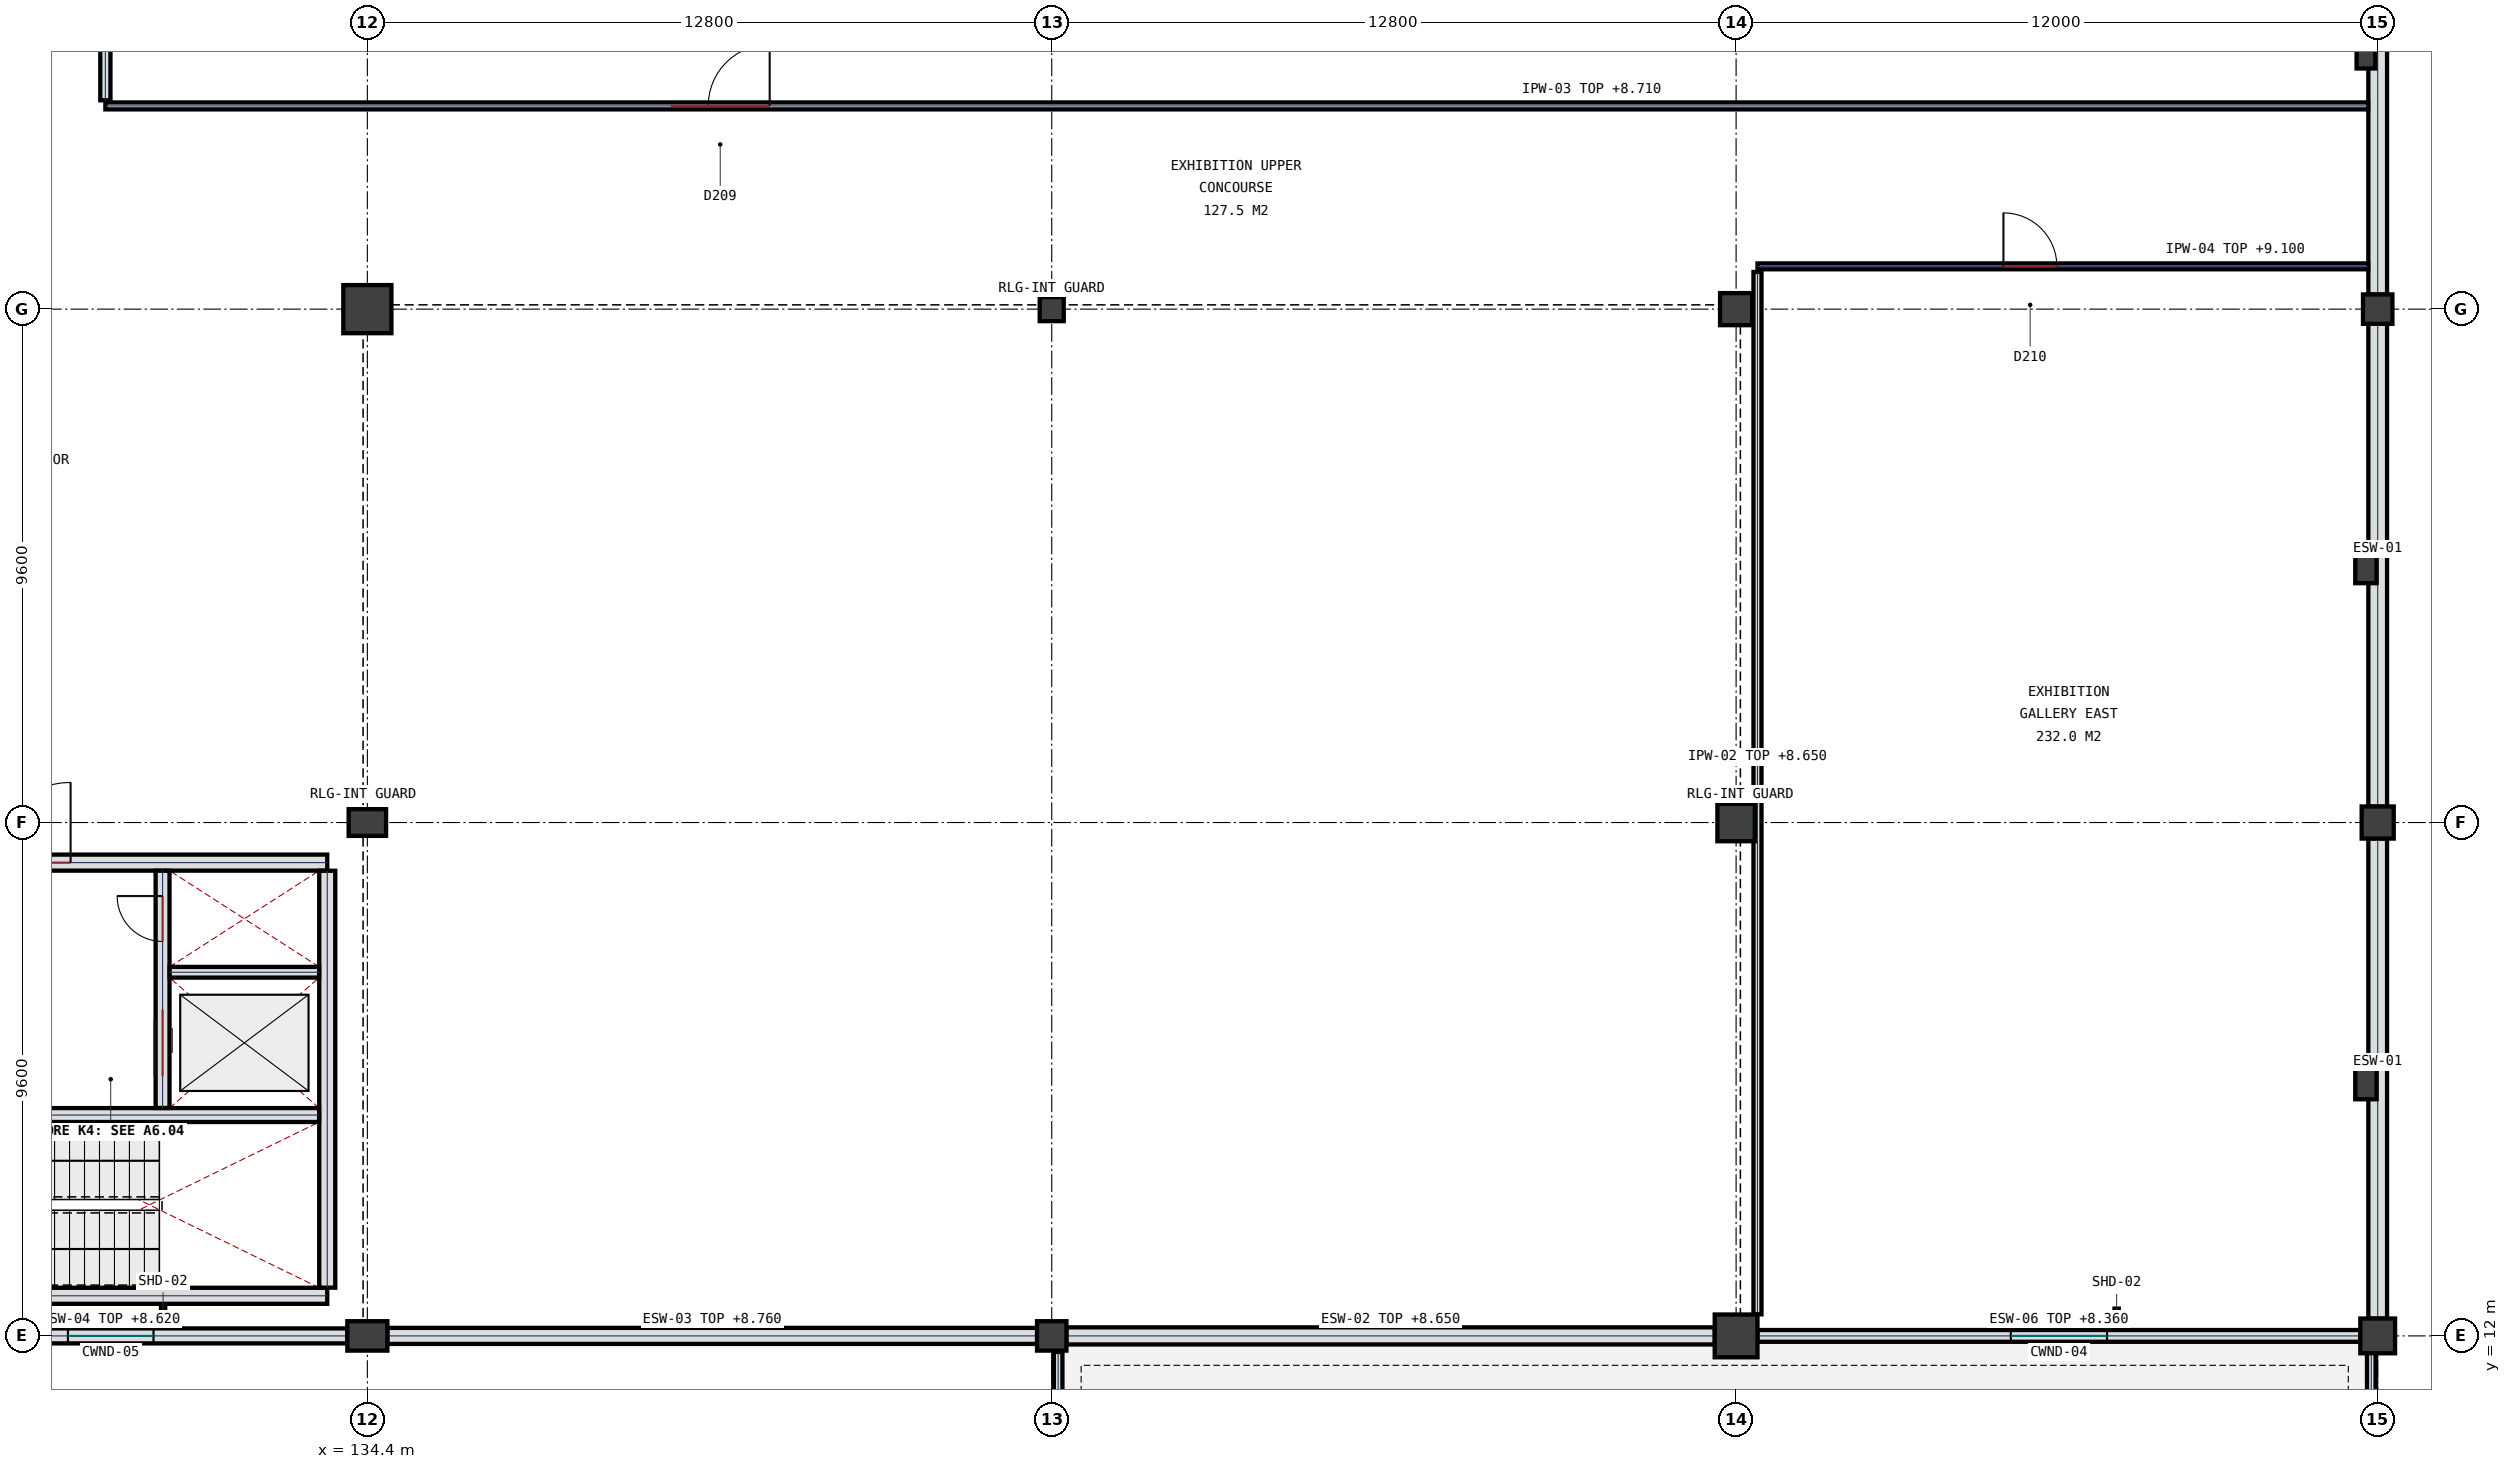
"""IFC4 building model, lengths in metres.
Left out: names, types, materials, properties, quantities, classifications, styles, units other than length and angle.
Written with IfcOpenShell. Run it as: python <this file> out.ifc"""

import sys

from ifc_helpers import new_model, si_unit, direction, frame, frame_2d, origin, origin_2d, place, context, subcontext, project, spatial, rectangle, circle, extrude, element, fill, save


model = new_model("IFC4")
c1 = context("Model", 3, precision=1e-05, world=origin(), true_north=direction((0.0, 1.0)))
c2 = subcontext(c1, "Body", "Model", "MODEL_VIEW")
j1 = project(units=[si_unit("LENGTHUNIT", "METRE"), si_unit("PLANEANGLEUNIT", "RADIAN")], contexts=[c1])
p1 = place(None, origin())
s1 = spatial("IfcSite", under=j1, at=p1, CompositionType="ELEMENT")
p2 = place(p1, origin())
s2 = spatial("IfcBuilding", under=s1, at=p2, CompositionType="ELEMENT")
p3 = place(p2, frame((0.0, 0.0, 5.4)))
s3 = spatial("IfcBuildingStorey", under=s2, at=p3, CompositionType="ELEMENT", Elevation=5.4)
p4 = place(p3, frame((134.4, 12.0, 0.0), z_axis=(0.0, 0.0, 1.0), x_axis=(1.0, 0.0, 0.0)))
e1 = element("IfcColumn", 1, at=p4, inside=s3, PredefinedType="COLUMN", context=c2, shape_type="SweptSolid", body=[
    extrude(rectangle(XDim=0.75, YDim=0.55, at=origin_2d()), origin(), (0.0, 0.0, 1.0), 4.5),
])
p5 = place(p3, frame((134.4, 21.6, 0.0), z_axis=(0.0, 0.0, 1.0), x_axis=(1.0, 0.0, 0.0)))
e2 = element("IfcColumn", 2, at=p5, inside=s3, PredefinedType="COLUMN", context=c2, shape_type="SweptSolid", body=[
    extrude(rectangle(XDim=0.7, YDim=0.5, at=origin_2d()), origin(), (0.0, 0.0, 1.0), 4.5),
])
p6 = place(p3, frame((134.4, 31.2, 0.0), z_axis=(0.0, 0.0, 1.0), x_axis=(1.0, 0.0, 0.0)))
e3 = element("IfcColumn", 3, at=p6, inside=s3, PredefinedType="COLUMN", context=c2, shape_type="SweptSolid", body=[
    extrude(circle(Radius=0.45, at=origin_2d()), origin(), (0.0, 0.0, 1.0), 4.5),
])
p7 = place(p3, frame((147.2, 12.0, 0.0), z_axis=(0.0, 0.0, 1.0), x_axis=(1.0, 0.0, 0.0)))
e4 = element("IfcColumn", 4, at=p7, inside=s3, PredefinedType="COLUMN", context=c2, shape_type="SweptSolid", body=[
    extrude(rectangle(XDim=0.55, YDim=0.55, at=origin_2d()), origin(), (0.0, 0.0, 1.0), 4.5),
])
p8 = place(p3, frame((147.2, 31.2, 0.0), z_axis=(0.0, 0.0, 1.0), x_axis=(1.0, 0.0, 0.0)))
e5 = element("IfcColumn", 5, at=p8, inside=s3, PredefinedType="COLUMN", context=c2, shape_type="SweptSolid", body=[
    extrude(rectangle(XDim=0.45, YDim=0.45, at=origin_2d()), origin(), (0.0, 0.0, 1.0), 4.5),
])
p9 = place(p3, frame((160.0, 12.0, 0.0), z_axis=(0.0, 0.0, 1.0), x_axis=(1.0, 0.0, 0.0)))
e6 = element("IfcColumn", 6, at=p9, inside=s3, PredefinedType="COLUMN", context=c2, shape_type="SweptSolid", body=[
    extrude(circle(Radius=0.4, at=origin_2d()), origin(), (0.0, 0.0, 1.0), 4.5),
])
p10 = place(p3, frame((160.0, 21.6, 0.0), z_axis=(0.0, 0.0, 1.0), x_axis=(1.0, 0.0, 0.0)))
e7 = element("IfcColumn", 7, at=p10, inside=s3, PredefinedType="COLUMN", context=c2, shape_type="SweptSolid", body=[
    extrude(circle(Radius=0.35, at=origin_2d()), origin(), (0.0, 0.0, 1.0), 4.5),
])
p11 = place(p3, frame((160.0, 31.2, 0.0), z_axis=(0.0, 0.0, 1.0), x_axis=(1.0, 0.0, 0.0)))
e8 = element("IfcColumn", 8, at=p11, inside=s3, PredefinedType="COLUMN", context=c2, shape_type="SweptSolid", body=[
    extrude(circle(Radius=0.3, at=origin_2d()), origin(), (0.0, 0.0, 1.0), 4.5),
])
p12 = place(p3, frame((172.0, 12.0, 0.0), z_axis=(0.0, 0.0, 1.0), x_axis=(1.0, 0.0, 0.0)))
e9 = element("IfcColumn", 9, at=p12, inside=s3, PredefinedType="COLUMN", context=c2, shape_type="SweptSolid", body=[
    extrude(rectangle(XDim=0.65, YDim=0.65, at=origin_2d()), origin(), (0.0, 0.0, 1.0), 4.5),
])
p13 = place(p3, frame((172.0, 21.6, 0.0), z_axis=(0.0, 0.0, 1.0), x_axis=(1.0, 0.0, 0.0)))
e10 = element("IfcColumn", 10, at=p13, inside=s3, PredefinedType="COLUMN", context=c2, shape_type="SweptSolid", body=[
    extrude(rectangle(XDim=0.6, YDim=0.6, at=origin_2d()), origin(), (0.0, 0.0, 1.0), 4.5),
])
p14 = place(p3, frame((172.0, 31.2, 0.0), z_axis=(0.0, 0.0, 1.0), x_axis=(1.0, 0.0, 0.0)))
e11 = element("IfcColumn", 11, at=p14, inside=s3, PredefinedType="COLUMN", context=c2, shape_type="SweptSolid", body=[
    extrude(rectangle(XDim=0.55, YDim=0.55, at=origin_2d()), origin(), (0.0, 0.0, 1.0), 4.5),
])
p15 = place(p3, frame((171.78, 16.8, 0.0), z_axis=(0.0, 0.0, 1.0), x_axis=(1.0, 0.0, 0.0)))
e12 = element("IfcColumn", 12, at=p15, inside=s3, PredefinedType="PILASTER", context=c2, shape_type="SweptSolid", body=[
    extrude(rectangle(XDim=0.4, YDim=0.75, at=origin_2d()), origin(), (0.0, 0.0, 1.0), 4.5),
])
p16 = place(p3, frame((171.78, 26.4, 0.0), z_axis=(0.0, 0.0, 1.0), x_axis=(1.0, 0.0, 0.0)))
e13 = element("IfcColumn", 13, at=p16, inside=s3, PredefinedType="PILASTER", context=c2, shape_type="SweptSolid", body=[
    extrude(rectangle(XDim=0.4, YDim=0.65, at=origin_2d()), origin(), (0.0, 0.0, 1.0), 4.5),
])
p17 = place(p3, frame((171.78, 36.0, 0.0), z_axis=(0.0, 0.0, 1.0), x_axis=(1.0, 0.0, 0.0)))
e14 = element("IfcColumn", 14, at=p17, inside=s3, PredefinedType="PILASTER", context=c2, shape_type="SweptSolid", body=[
    extrude(rectangle(XDim=0.35, YDim=0.6, at=origin_2d()), origin(), (0.0, 0.0, 1.0), 4.5),
])
p18 = place(p3, frame((172.0, 40.552, 0.0), z_axis=(0.0, 0.0, 1.0), x_axis=(0.0, -1.0, 0.0)))
e15 = element("IfcWall", 15, at=p18, inside=s3, PredefinedType="SOLIDWALL", context=c2, shape_type="SweptSolid", body=[
    extrude(rectangle(XDim=9.079, YDim=0.35, at=frame_2d((4.54, 0.0))), origin(), (0.0, 0.0, 1.0), 4.26),
])
p19 = place(p3, frame((172.0, 30.927, 0.0), z_axis=(0.0, 0.0, 1.0), x_axis=(0.0, -1.0, 0.0)))
e16 = element("IfcWall", 16, at=p19, inside=s3, PredefinedType="SOLIDWALL", context=c2, shape_type="SweptSolid", body=[
    extrude(rectangle(XDim=9.029, YDim=0.35, at=frame_2d((4.515, 0.0))), origin(), (0.0, 0.0, 1.0), 4.26),
])
p20 = place(p3, frame((172.0, 21.302, 0.0), z_axis=(0.0, 0.0, 1.0), x_axis=(0.0, -1.0, 0.0)))
e17 = element("IfcWall", 17, at=p20, inside=s3, PredefinedType="SOLIDWALL", context=c2, shape_type="SweptSolid", body=[
    extrude(rectangle(XDim=8.979, YDim=0.35, at=frame_2d((4.49, 0.0))), origin(), (0.0, 0.0, 1.0), 4.26),
])
p21 = place(p3, frame((171.677, 12.0, 0.0), z_axis=(0.0, 0.0, 1.0), x_axis=(-1.0, 0.0, 0.0)))
e18 = element("IfcWall", 18, at=p21, inside=s3, PredefinedType="SOLIDWALL", context=c2, shape_type="SweptSolid", body=[
    extrude(rectangle(XDim=11.279, YDim=0.22, at=frame_2d((5.64, 0.0))), origin(), (0.0, 0.0, 1.0), 2.96),
])
p22 = place(p21, frame((4.74, 0.0, 0.95)))
e19 = element("IfcOpeningElement", 19, at=p22, cuts=e18, PredefinedType="OPENING", context=c2, shape_type="SweptSolid", body=[
    extrude(rectangle(XDim=1.8, YDim=1.55, at=frame_2d((0.9, 0.775))), frame((0.0, 0.12, 0.0), z_axis=(0.0, -1.0, 0.0), x_axis=(1.0, 0.0, 0.0)), (0.0, 0.0, 1.0), 0.24),
])
p23 = place(p3, frame((159.602, 12.0, 0.0), z_axis=(0.0, 0.0, 1.0), x_axis=(-1.0, 0.0, 0.0)))
e20 = element("IfcWall", 20, at=p23, inside=s3, PredefinedType="SOLIDWALL", context=c2, shape_type="SweptSolid", body=[
    extrude(rectangle(XDim=12.129, YDim=0.32, at=frame_2d((6.064, 0.0))), origin(), (0.0, 0.0, 1.0), 3.25),
])
p24 = place(p3, frame((146.927, 12.0, 0.0), z_axis=(0.0, 0.0, 1.0), x_axis=(-1.0, 0.0, 0.0)))
e21 = element("IfcWall", 21, at=p24, inside=s3, PredefinedType="SOLIDWALL", context=c2, shape_type="SweptSolid", body=[
    extrude(rectangle(XDim=12.154, YDim=0.3, at=frame_2d((6.077, 0.0))), origin(), (0.0, 0.0, 1.0), 3.36),
])
p25 = place(p3, frame((134.027, 12.0, 0.0), z_axis=(0.0, 0.0, 1.0), x_axis=(-1.0, 0.0, 0.0)))
e22 = element("IfcWall", 22, at=p25, inside=s3, PredefinedType="SOLIDWALL", context=c2, shape_type="SweptSolid", body=[
    extrude(rectangle(XDim=8.854, YDim=0.28, at=frame_2d((4.427, 0.0))), origin(), (0.0, 0.0, 1.0), 3.22),
])
p26 = place(p25, frame((3.627, 0.0, 0.95)))
e23 = element("IfcOpeningElement", 23, at=p26, cuts=e22, PredefinedType="OPENING", context=c2, shape_type="SweptSolid", body=[
    extrude(rectangle(XDim=1.6, YDim=1.55, at=frame_2d((0.8, 0.775))), frame((0.0, 0.15, 0.0), z_axis=(0.0, -1.0, 0.0), x_axis=(1.0, 0.0, 0.0)), (0.0, 0.0, 1.0), 0.3),
])
for number, where, z_axis, x_axis in (
    (24, (147.32, 0.3, 0.0), (0.0, 0.0, 1.0), (0.0, 1.0, 0.0)),
    (25, (171.88, 0.3, 0.0), (0.0, 0.0, 1.0), (0.0, 1.0, 0.0)),
):
    element("IfcWall", number, at=place(p3, frame(where, z_axis=z_axis, x_axis=x_axis)), inside=s3, PredefinedType="PARAPET", context=c2, shape_type="SweptSolid", body=[
        extrude(rectangle(XDim=11.4, YDim=0.16, at=frame_2d((5.7, 0.0))), origin(), (0.0, 0.0, 1.0), 1.15),
    ])
p27 = place(p3, frame((133.65, 12.75, 0.0), z_axis=(0.0, 0.0, 1.0), x_axis=(-1.0, 0.0, 0.0)))
e26 = element("IfcWall", 26, at=p27, inside=s3, PredefinedType="SHEAR", context=c2, shape_type="SweptSolid", body=[
    extrude(rectangle(XDim=8.1, YDim=0.3, at=frame_2d((4.05, 0.0))), origin(), (0.0, 0.0, 1.0), 4.5),
])
p28 = place(p3, frame((125.55, 20.85, 0.0), z_axis=(0.0, 0.0, 1.0), x_axis=(1.0, 0.0, 0.0)))
e27 = element("IfcWall", 27, at=p28, inside=s3, PredefinedType="SHEAR", context=c2, shape_type="SweptSolid", body=[
    extrude(rectangle(XDim=8.1, YDim=0.3, at=frame_2d((4.05, 0.0))), origin(), (0.0, 0.0, 1.0), 4.5),
])
p29 = place(p28, frame((1.8, 0.0, 0.0)))
e28 = element("IfcOpeningElement", 28, at=p29, cuts=e27, PredefinedType="OPENING", context=c2, shape_type="SweptSolid", body=[
    extrude(rectangle(XDim=1.5, YDim=2.25, at=frame_2d((0.75, 1.125))), frame((0.0, 0.16, 0.0), z_axis=(0.0, -1.0, 0.0), x_axis=(1.0, 0.0, 0.0)), (0.0, 0.0, 1.0), 0.32),
])
p30 = place(p3, frame((133.65, 20.698, 0.0), z_axis=(0.0, 0.0, 1.0), x_axis=(0.0, -1.0, 0.0)))
e29 = element("IfcWall", 29, at=p30, inside=s3, PredefinedType="SHEAR", context=c2, shape_type="SweptSolid", body=[
    extrude(rectangle(XDim=7.796, YDim=0.3, at=frame_2d((3.898, 0.0))), origin(), (0.0, 0.0, 1.0), 4.5),
])
p31 = place(p3, frame((125.702, 16.13, 0.0), z_axis=(0.0, 0.0, 1.0), x_axis=(1.0, 0.0, 0.0)))
e30 = element("IfcWall", 30, at=p31, inside=s3, PredefinedType="SHEAR", context=c2, shape_type="SweptSolid", body=[
    extrude(rectangle(XDim=7.796, YDim=0.26, at=frame_2d((3.898, 0.0))), origin(), (0.0, 0.0, 1.0), 4.5),
])
p32 = place(p31, frame((0.148, 0.0, 0.0)))
e31 = element("IfcOpeningElement", 31, at=p32, cuts=e30, PredefinedType="OPENING", context=c2, shape_type="SweptSolid", body=[
    extrude(rectangle(XDim=1.2, YDim=2.2, at=frame_2d((0.6, 1.1))), frame((0.0, 0.14, 0.0), z_axis=(0.0, -1.0, 0.0), x_axis=(1.0, 0.0, 0.0)), (0.0, 0.0, 1.0), 0.28),
])
p33 = place(p3, frame((130.57, 16.262, 0.0), z_axis=(0.0, 0.0, 1.0), x_axis=(0.0, 1.0, 0.0)))
e32 = element("IfcWall", 32, at=p33, inside=s3, PredefinedType="SHEAR", context=c2, shape_type="SweptSolid", body=[
    extrude(rectangle(XDim=4.436, YDim=0.26, at=frame_2d((2.218, 0.0))), origin(), (0.0, 0.0, 1.0), 4.5),
])
p34 = place(p33, frame((3.113, 0.0, 0.0)))
e33 = element("IfcOpeningElement", 33, at=p34, cuts=e32, PredefinedType="OPENING", context=c2, shape_type="SweptSolid", body=[
    extrude(rectangle(XDim=0.85, YDim=2.05, at=frame_2d((0.425, 1.025))), frame((0.0, 0.14, 0.0), z_axis=(0.0, -1.0, 0.0), x_axis=(1.0, 0.0, 0.0)), (0.0, 0.0, 1.0), 0.28),
])
p35 = place(p33, frame((0.593, 0.0, 0.0)))
e34 = element("IfcOpeningElement", 34, at=p35, cuts=e32, PredefinedType="OPENING", context=c2, shape_type="SweptSolid", body=[
    extrude(rectangle(XDim=1.25, YDim=2.2, at=frame_2d((0.625, 1.1))), frame((0.0, 0.14, 0.0), z_axis=(0.0, -1.0, 0.0), x_axis=(1.0, 0.0, 0.0)), (0.0, 0.0, 1.0), 0.28),
])
p36 = place(p3, frame((130.702, 18.8, 0.0), z_axis=(0.0, 0.0, 1.0), x_axis=(1.0, 0.0, 0.0)))
e35 = element("IfcWall", 35, at=p36, inside=s3, PredefinedType="PLUMBINGWALL", context=c2, shape_type="SweptSolid", body=[
    extrude(rectangle(XDim=2.796, YDim=0.2, at=frame_2d((1.398, 0.0))), origin(), (0.0, 0.0, 1.0), 4.22),
])
p37 = place(p3, frame((129.5, 35.0, 0.0), z_axis=(0.0, 0.0, 1.0), x_axis=(1.0, 0.0, 0.0)))
e36 = element("IfcWall", 36, at=p37, inside=s3, PredefinedType="PARTITIONING", context=c2, shape_type="SweptSolid", body=[
    extrude(rectangle(XDim=42.322, YDim=0.13, at=frame_2d((21.161, 0.0))), origin(), (0.0, 0.0, 1.0), 3.31),
])
p38 = place(p37, frame((10.575, 0.0, 0.0)))
e37 = element("IfcOpeningElement", 37, at=p38, cuts=e36, PredefinedType="OPENING", context=c2, shape_type="SweptSolid", body=[
    extrude(rectangle(XDim=1.85, YDim=2.35, at=frame_2d((0.925, 1.175))), frame((0.0, 0.075, 0.0), z_axis=(0.0, -1.0, 0.0), x_axis=(1.0, 0.0, 0.0)), (0.0, 0.0, 1.0), 0.15),
])
p39 = place(p3, frame((160.4, 32.0, 0.0), z_axis=(0.0, 0.0, 1.0), x_axis=(1.0, 0.0, 0.0)))
e38 = element("IfcWall", 38, at=p39, inside=s3, PredefinedType="PARTITIONING", context=c2, shape_type="SweptSolid", body=[
    extrude(rectangle(XDim=11.422, YDim=0.11, at=frame_2d((5.711, 0.0))), origin(), (0.0, 0.0, 1.0), 3.7),
])
p40 = place(p39, frame((4.6, 0.0, 0.0)))
e39 = element("IfcOpeningElement", 39, at=p40, cuts=e38, PredefinedType="OPENING", context=c2, shape_type="SweptSolid", body=[
    extrude(rectangle(XDim=1.0, YDim=2.2, at=frame_2d((0.5, 1.1))), frame((0.0, 0.065, 0.0), z_axis=(0.0, -1.0, 0.0), x_axis=(1.0, 0.0, 0.0)), (0.0, 0.0, 1.0), 0.13),
])
p41 = place(p3, frame((129.5, 35.105, 0.0), z_axis=(0.0, 0.0, 1.0), x_axis=(0.0, 1.0, 0.0)))
e40 = element("IfcWall", 40, at=p41, inside=s3, PredefinedType="PARTITIONING", context=c2, shape_type="SweptSolid", body=[
    extrude(rectangle(XDim=5.566, YDim=0.19, at=frame_2d((2.783, 0.0))), origin(), (0.0, 0.0, 1.0), 2.65),
])
p42 = place(p3, frame((160.4, 12.403, 0.0), z_axis=(0.0, 0.0, 1.0), x_axis=(0.0, 1.0, 0.0)))
e41 = element("IfcWall", 41, at=p42, inside=s3, PredefinedType="PARTITIONING", context=c2, shape_type="SweptSolid", body=[
    extrude(rectangle(XDim=19.492, YDim=0.15, at=frame_2d((9.746, 0.0))), origin(), (0.0, 0.0, 1.0), 3.25),
])
p43 = place(p22, origin())
e42 = element("IfcWindow", 42, at=p43, inside=s3, PartitioningType="SINGLE_PANEL", PredefinedType="WINDOW", context=c2, shape_type="SweptSolid", body=[
    extrude(rectangle(XDim=1.8, YDim=1.55, at=frame_2d((0.9, 0.775))), frame((0.0, 0.032, 0.0), z_axis=(0.0, -1.0, 0.0), x_axis=(1.0, 0.0, 0.0)), (0.0, 0.0, 1.0), 0.065),
])
fill(e19, e42)
p44 = place(p26, origin())
e43 = element("IfcWindow", 43, at=p44, inside=s3, PartitioningType="SINGLE_PANEL", PredefinedType="WINDOW", context=c2, shape_type="SweptSolid", body=[
    extrude(rectangle(XDim=1.6, YDim=1.55, at=frame_2d((0.8, 0.775))), frame((0.0, 0.032, 0.0), z_axis=(0.0, -1.0, 0.0), x_axis=(1.0, 0.0, 0.0)), (0.0, 0.0, 1.0), 0.065),
])
fill(e23, e43)
p45 = place(p29, origin())
e44 = element("IfcDoor", 44, at=p45, inside=s3, OperationType="SINGLE_SWING_RIGHT", PredefinedType="DOOR", context=c2, shape_type="SweptSolid", body=[
    extrude(rectangle(XDim=1.5, YDim=2.25, at=frame_2d((0.75, 1.125))), frame((0.0, 0.032, 0.0), z_axis=(0.0, -1.0, 0.0), x_axis=(1.0, 0.0, 0.0)), (0.0, 0.0, 1.0), 0.065),
])
fill(e28, e44)
p46 = place(p34, origin())
e45 = element("IfcDoor", 45, at=p46, inside=s3, OperationType="SINGLE_SWING_RIGHT", PredefinedType="DOOR", context=c2, shape_type="SweptSolid", body=[
    extrude(rectangle(XDim=0.85, YDim=2.05, at=frame_2d((0.425, 1.025))), frame((0.0, 0.032, 0.0), z_axis=(0.0, -1.0, 0.0), x_axis=(1.0, 0.0, 0.0)), (0.0, 0.0, 1.0), 0.065),
])
fill(e33, e45)
p47 = place(p35, origin())
e46 = element("IfcDoor", 46, at=p47, inside=s3, OperationType="SLIDING_TO_LEFT", PredefinedType="DOOR", context=c2, shape_type="SweptSolid", body=[
    extrude(rectangle(XDim=1.25, YDim=2.2, at=frame_2d((0.625, 1.1))), frame((0.0, 0.032, 0.0), z_axis=(0.0, -1.0, 0.0), x_axis=(1.0, 0.0, 0.0)), (0.0, 0.0, 1.0), 0.065),
])
fill(e34, e46)
p48 = place(p38, origin())
e47 = element("IfcDoor", 47, at=p48, inside=s3, OperationType="SINGLE_SWING_RIGHT", PredefinedType="DOOR", context=c2, shape_type="SweptSolid", body=[
    extrude(rectangle(XDim=1.85, YDim=2.35, at=frame_2d((0.925, 1.175))), frame((0.0, 0.032, 0.0), z_axis=(0.0, -1.0, 0.0), x_axis=(1.0, 0.0, 0.0)), (0.0, 0.0, 1.0), 0.065),
])
fill(e37, e47)
p49 = place(p40, origin())
e48 = element("IfcDoor", 48, at=p49, inside=s3, OperationType="SINGLE_SWING_LEFT", PredefinedType="DOOR", context=c2, shape_type="SweptSolid", body=[
    extrude(rectangle(XDim=1.0, YDim=2.2, at=frame_2d((0.5, 1.1))), frame((0.0, 0.032, 0.0), z_axis=(0.0, -1.0, 0.0), x_axis=(1.0, 0.0, 0.0)), (0.0, 0.0, 1.0), 0.065),
])
fill(e39, e48)
save(model, sys.argv[1])
